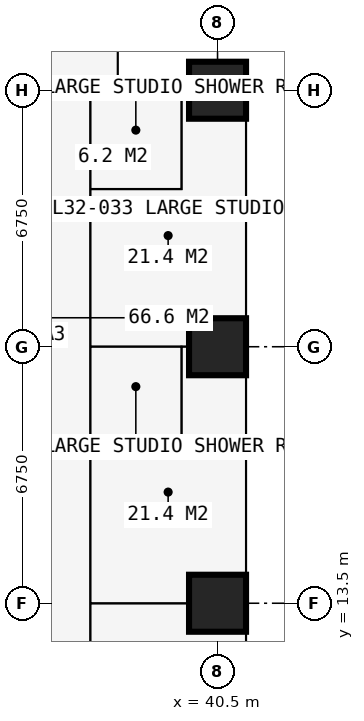
"""IFC4 building model, lengths in metres.
Left out: names, types, materials, properties, quantities, classifications, styles, units other than length and angle.
Written with IfcOpenShell. Run it as: python <this file> out.ifc"""

import sys

from ifc_helpers import new_model, si_unit, direction, frame, frame_2d, origin, origin_2d, place, context, subcontext, project, spatial, rectangle, extrude, element, fill, save


model = new_model("IFC4")
c1 = context("Model", 3, precision=1e-05, world=origin(), true_north=direction((0.0, 1.0)))
c2 = subcontext(c1, "Body", "Model", "MODEL_VIEW")
j1 = project(units=[si_unit("LENGTHUNIT", "METRE"), si_unit("PLANEANGLEUNIT", "RADIAN")], contexts=[c1])
p1 = place(None, origin())
s1 = spatial("IfcSite", under=j1, at=p1, CompositionType="ELEMENT")
p2 = place(p1, origin())
s2 = spatial("IfcBuilding", under=s1, at=p2, CompositionType="ELEMENT")
p3 = place(p2, frame((0.0, 0.0, 119.7)))
s3 = spatial("IfcBuildingStorey", under=s2, at=p3, CompositionType="ELEMENT", Elevation=119.7)
for number, where, z_axis, x_axis in (
    (1, (40.5, 13.5, 0.0), (0.0, 0.0, 1.0), (1.0, 0.0, 0.0)),
    (2, (40.5, 20.25, 0.0), (0.0, 0.0, 1.0), (1.0, 0.0, 0.0)),
    (3, (40.5, 27.0, 0.0), (0.0, 0.0, 1.0), (1.0, 0.0, 0.0)),
):
    element("IfcColumn", number, at=place(p3, frame(where, z_axis=z_axis, x_axis=x_axis)), inside=s3, PredefinedType="COLUMN", context=c2, shape_type="SweptSolid", body=[
        extrude(rectangle(XDim=1.5, YDim=1.5, at=origin_2d()), origin(), (0.0, 0.0, 1.0), 3.6),
    ])
p4 = place(p3, frame((41.25, 27.75, 0.0), z_axis=(0.0, 0.0, 1.0), x_axis=(-1.0, 0.0, 0.0)))
e4 = element("IfcWall", 4, at=p4, inside=s3, PredefinedType="SOLIDWALL", context=c2, shape_type="SweptSolid", body=[
    extrude(rectangle(XDim=3.375, YDim=0.3, at=frame_2d((1.688, 0.0))), origin(), (0.0, 0.0, 1.0), 3.375),
])
p5 = place(p4, frame((1.607, 0.0, 0.9)))
e5 = element("IfcOpeningElement", 5, at=p5, cuts=e4, PredefinedType="OPENING", context=c2, shape_type="SweptSolid", body=[
    extrude(rectangle(XDim=1.5, YDim=1.8, at=frame_2d((0.75, 0.9))), frame((0.0, 0.16, 0.0), z_axis=(0.0, -1.0, 0.0), x_axis=(1.0, 0.0, 0.0)), (0.0, 0.0, 1.0), 0.32),
])
p6 = place(p3, frame((37.875, 27.75, 0.0), z_axis=(0.0, 0.0, 1.0), x_axis=(0.0, 1.0, 0.0)))
e6 = element("IfcWall", 6, at=p6, inside=s3, PredefinedType="SOLIDWALL", context=c2, shape_type="SweptSolid", body=[
    extrude(rectangle(XDim=3.375, YDim=0.3, at=frame_2d((1.688, 0.0))), origin(), (0.0, 0.0, 1.0), 3.375),
])
p7 = place(p6, frame((0.788, 0.0, 0.6)))
e7 = element("IfcOpeningElement", 7, at=p7, cuts=e6, PredefinedType="OPENING", context=c2, shape_type="SweptSolid", body=[
    extrude(rectangle(XDim=1.8, YDim=2.1, at=frame_2d((0.9, 1.05))), frame((0.0, 0.16, 0.0), z_axis=(0.0, -1.0, 0.0), x_axis=(1.0, 0.0, 0.0)), (0.0, 0.0, 1.0), 0.32),
])
p8 = place(p3, frame((37.15, 6.75, 0.0), z_axis=(0.0, 0.0, 1.0), x_axis=(0.0, 1.0, 0.0)))
e8 = element("IfcWall", 8, at=p8, inside=s3, PredefinedType="PARTITIONING", context=c2, shape_type="SweptSolid", body=[
    extrude(rectangle(XDim=20.25, YDim=0.15, at=frame_2d((10.125, 0.0))), origin(), (0.0, 0.0, 1.0), 3.375),
])
p9 = place(p8, frame((15.1, 0.0, 0.0)))
e9 = element("IfcOpeningElement", 9, at=p9, cuts=e8, PredefinedType="OPENING", context=c2, shape_type="SweptSolid", body=[
    extrude(rectangle(XDim=0.95, YDim=2.2, at=frame_2d((0.475, 1.1))), frame((0.0, 0.085, 0.0), z_axis=(0.0, -1.0, 0.0), x_axis=(1.0, 0.0, 0.0)), (0.0, 0.0, 1.0), 0.17),
])
p10 = place(p8, frame((8.35, 0.0, 0.0)))
e10 = element("IfcOpeningElement", 10, at=p10, cuts=e8, PredefinedType="OPENING", context=c2, shape_type="SweptSolid", body=[
    extrude(rectangle(XDim=0.95, YDim=2.2, at=frame_2d((0.475, 1.1))), frame((0.0, 0.085, 0.0), z_axis=(0.0, -1.0, 0.0), x_axis=(1.0, 0.0, 0.0)), (0.0, 0.0, 1.0), 0.17),
])
p11 = place(p3, frame((37.15, 13.5, 0.0), z_axis=(0.0, 0.0, 1.0), x_axis=(1.0, 0.0, 0.0)))
e11 = element("IfcWall", 11, at=p11, inside=s3, PredefinedType="PARTITIONING", context=c2, shape_type="SweptSolid", body=[
    extrude(rectangle(XDim=4.084, YDim=0.15, at=frame_2d((2.042, 0.0))), origin(), (0.0, 0.0, 1.0), 2.61),
])
p12 = place(p3, frame((37.15, 17.65, 0.0), z_axis=(0.0, 0.0, 1.0), x_axis=(1.0, 0.0, 0.0)))
e12 = element("IfcWall", 12, at=p12, inside=s3, PredefinedType="PARTITIONING", context=c2, shape_type="SweptSolid", body=[
    extrude(rectangle(XDim=2.4, YDim=0.1, at=frame_2d((1.2, 0.0))), origin(), (0.0, 0.0, 1.0), 3.375),
])
p13 = place(p3, frame((37.15, 20.25, 0.0), z_axis=(0.0, 0.0, 1.0), x_axis=(1.0, 0.0, 0.0)))
e13 = element("IfcWall", 13, at=p13, inside=s3, PredefinedType="PARTITIONING", context=c2, shape_type="SweptSolid", body=[
    extrude(rectangle(XDim=4.084, YDim=0.1, at=frame_2d((2.042, 0.0))), origin(), (0.0, 0.0, 1.0), 2.61),
])
p14 = place(p13, frame((0.75, 0.0, 0.0)))
e14 = element("IfcOpeningElement", 14, at=p14, cuts=e13, PredefinedType="OPENING", context=c2, shape_type="SweptSolid", body=[
    extrude(rectangle(XDim=0.9, YDim=2.2, at=frame_2d((0.45, 1.1))), frame((0.0, 0.06, 0.0), z_axis=(0.0, -1.0, 0.0), x_axis=(1.0, 0.0, 0.0)), (0.0, 0.0, 1.0), 0.12),
])
p15 = place(p3, frame((37.15, 24.4, 0.0), z_axis=(0.0, 0.0, 1.0), x_axis=(1.0, 0.0, 0.0)))
e15 = element("IfcWall", 15, at=p15, inside=s3, PredefinedType="PARTITIONING", context=c2, shape_type="SweptSolid", body=[
    extrude(rectangle(XDim=2.4, YDim=0.1, at=frame_2d((1.2, 0.0))), origin(), (0.0, 0.0, 1.0), 3.375),
])
p16 = place(p3, frame((37.15, 27.0, 0.0), z_axis=(0.0, 0.0, 1.0), x_axis=(1.0, 0.0, 0.0)))
e16 = element("IfcWall", 16, at=p16, inside=s3, PredefinedType="PARTITIONING", context=c2, shape_type="SweptSolid", body=[
    extrude(rectangle(XDim=4.084, YDim=0.1, at=frame_2d((2.042, 0.0))), origin(), (0.0, 0.0, 1.0), 2.877),
])
p17 = place(p3, frame((37.875, 27.0, 0.0), z_axis=(0.0, 0.0, 1.0), x_axis=(0.0, 1.0, 0.0)))
e17 = element("IfcWall", 17, at=p17, inside=s3, PredefinedType="PARTITIONING", context=c2, shape_type="SweptSolid", body=[
    extrude(rectangle(XDim=0.734, YDim=0.15, at=frame_2d((0.367, 0.0))), origin(), (0.0, 0.0, 1.0), 3.375),
])
p18 = place(p3, frame((39.55, 17.65, 0.0), z_axis=(0.0, 0.0, 1.0), x_axis=(0.0, 1.0, 0.0)))
e18 = element("IfcWall", 18, at=p18, inside=s3, PredefinedType="PARTITIONING", context=c2, shape_type="SweptSolid", body=[
    extrude(rectangle(XDim=2.6, YDim=0.1, at=frame_2d((1.3, 0.0))), origin(), (0.0, 0.0, 1.0), 3.375),
])
p19 = place(p3, frame((39.55, 24.4, 0.0), z_axis=(0.0, 0.0, 1.0), x_axis=(0.0, 1.0, 0.0)))
e19 = element("IfcWall", 19, at=p19, inside=s3, PredefinedType="PARTITIONING", context=c2, shape_type="SweptSolid", body=[
    extrude(rectangle(XDim=2.6, YDim=0.1, at=frame_2d((1.3, 0.0))), origin(), (0.0, 0.0, 1.0), 3.375),
])
p20 = place(p19, frame((0.85, 0.0, 0.0)))
e20 = element("IfcOpeningElement", 20, at=p20, cuts=e19, PredefinedType="OPENING", context=c2, shape_type="SweptSolid", body=[
    extrude(rectangle(XDim=0.9, YDim=2.2, at=frame_2d((0.45, 1.1))), frame((0.0, 0.06, 0.0), z_axis=(0.0, -1.0, 0.0), x_axis=(1.0, 0.0, 0.0)), (0.0, 0.0, 1.0), 0.12),
])
p21 = place(p5, origin())
e21 = element("IfcWindow", 21, at=p21, inside=s3, PartitioningType="SINGLE_PANEL", PredefinedType="WINDOW", context=c2, shape_type="SweptSolid", body=[
    extrude(rectangle(XDim=1.5, YDim=1.8, at=frame_2d((0.75, 0.9))), frame((0.0, 0.03, 0.0), z_axis=(0.0, -1.0, 0.0), x_axis=(1.0, 0.0, 0.0)), (0.0, 0.0, 1.0), 0.06),
])
fill(e5, e21)
p22 = place(p9, origin())
e22 = element("IfcDoor", 22, at=p22, inside=s3, OperationType="SINGLE_SWING_LEFT", PredefinedType="DOOR", context=c2, shape_type="SweptSolid", body=[
    extrude(rectangle(XDim=0.95, YDim=2.2, at=frame_2d((0.475, 1.1))), frame((0.0, 0.025, 0.0), z_axis=(0.0, -1.0, 0.0), x_axis=(1.0, 0.0, 0.0)), (0.0, 0.0, 1.0), 0.05),
])
fill(e9, e22)
p23 = place(p20, origin())
e23 = element("IfcDoor", 23, at=p23, inside=s3, OperationType="SINGLE_SWING_RIGHT", PredefinedType="DOOR", context=c2, shape_type="SweptSolid", body=[
    extrude(rectangle(XDim=0.9, YDim=2.2, at=frame_2d((0.45, 1.1))), frame((0.0, 0.025, 0.0), z_axis=(0.0, -1.0, 0.0), x_axis=(1.0, 0.0, 0.0)), (0.0, 0.0, 1.0), 0.05),
])
fill(e20, e23)
p24 = place(p10, origin())
e24 = element("IfcDoor", 24, at=p24, inside=s3, OperationType="SINGLE_SWING_LEFT", PredefinedType="DOOR", context=c2, shape_type="SweptSolid", body=[
    extrude(rectangle(XDim=0.95, YDim=2.2, at=frame_2d((0.475, 1.1))), frame((0.0, 0.025, 0.0), z_axis=(0.0, -1.0, 0.0), x_axis=(1.0, 0.0, 0.0)), (0.0, 0.0, 1.0), 0.05),
])
fill(e10, e24)
p25 = place(p14, origin())
e25 = element("IfcDoor", 25, at=p25, inside=s3, OperationType="SINGLE_SWING_RIGHT", PredefinedType="DOOR", context=c2, shape_type="SweptSolid", body=[
    extrude(rectangle(XDim=0.9, YDim=2.2, at=frame_2d((0.45, 1.1))), frame((0.0, 0.025, 0.0), z_axis=(0.0, -1.0, 0.0), x_axis=(1.0, 0.0, 0.0)), (0.0, 0.0, 1.0), 0.05),
])
fill(e14, e25)
save(model, sys.argv[1])
